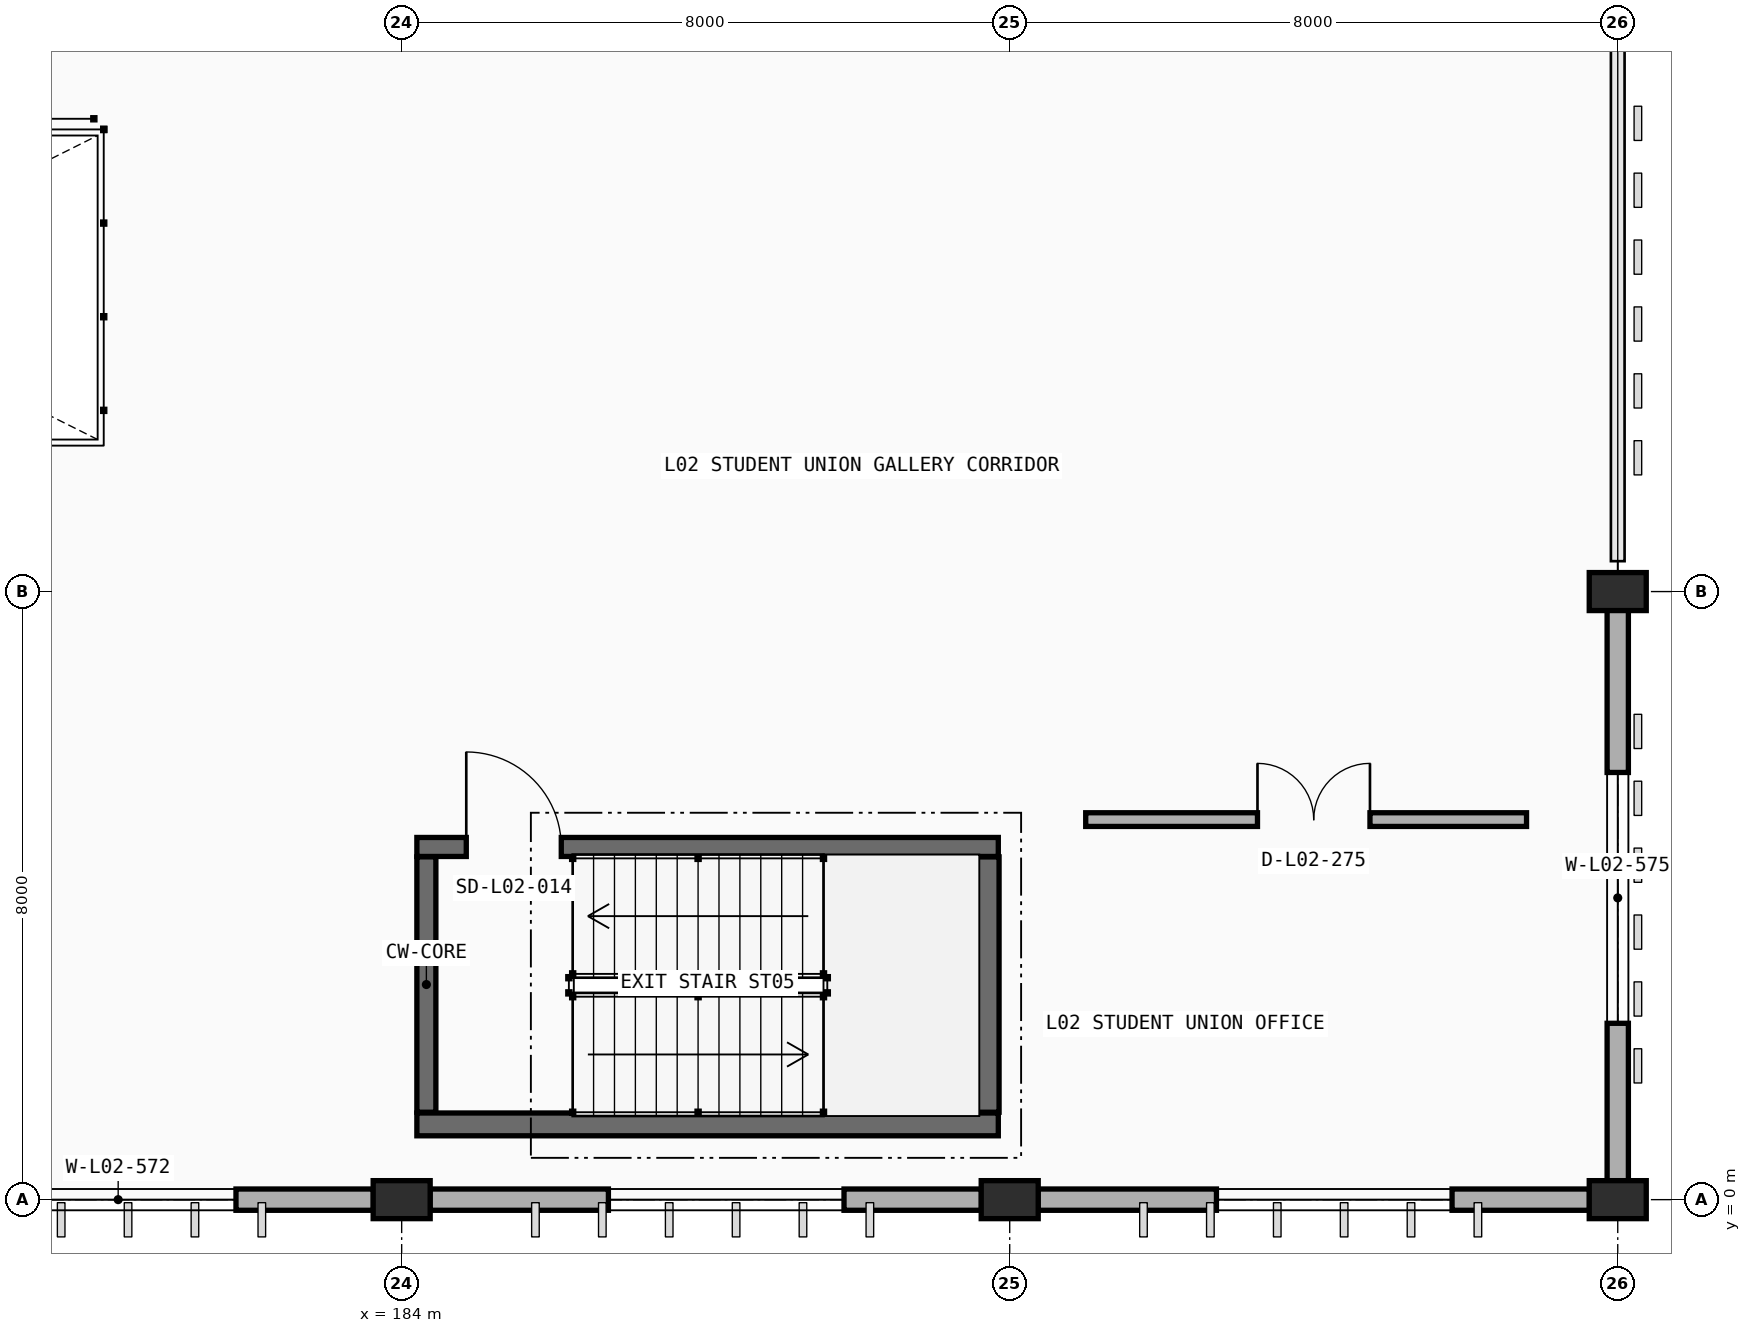
"""IFC4 building model, lengths in metres.
Left out: names, types, materials, properties, quantities, classifications, styles, units other than length and angle.
Written with IfcOpenShell. Run it as: python <this file> out.ifc"""

import sys

from ifc_helpers import new_model, si_unit, direction, frame, frame_2d, origin, origin_2d, place, context, subcontext, project, spatial, rectangle, extrude, element, fill, save


model = new_model("IFC4")
c1 = context("Model", 3, precision=1e-05, world=origin(), true_north=direction((0.0, 1.0)))
c2 = subcontext(c1, "Body", "Model", "MODEL_VIEW")
j1 = project(units=[si_unit("LENGTHUNIT", "METRE"), si_unit("PLANEANGLEUNIT", "RADIAN")], contexts=[c1])
p1 = place(None, origin())
s1 = spatial("IfcSite", under=j1, at=p1, CompositionType="ELEMENT")
p2 = place(p1, origin())
s2 = spatial("IfcBuilding", under=s1, at=p2, CompositionType="ELEMENT")
p3 = place(p2, frame((0.0, 0.0, 4.8)))
s3 = spatial("IfcBuildingStorey", under=s2, at=p3, CompositionType="ELEMENT", Elevation=4.8)
for number, where, z_axis, x_axis in (
    (1, (184.0, 0.0, 0.0), (0.0, 0.0, 1.0), (0.0, 1.0, 0.0)),
    (2, (192.0, 0.0, 0.0), (0.0, 0.0, 1.0), (0.0, 1.0, 0.0)),
    (3, (200.0, 0.0, 0.0), (0.0, 0.0, 1.0), (0.0, 1.0, 0.0)),
    (4, (200.0, 8.0, 0.0), (0.0, 0.0, 1.0), (0.0, 1.0, 0.0)),
):
    element("IfcColumn", number, at=place(p3, frame(where, z_axis=z_axis, x_axis=x_axis)), inside=s3, PredefinedType="COLUMN", context=c2, shape_type="SweptSolid", body=[
        extrude(rectangle(XDim=0.5, YDim=0.75, at=origin_2d()), origin(), (0.0, 0.0, 1.0), 4.8),
    ])
p4 = place(p3, frame((183.628, 0.0, 0.0), z_axis=(0.0, 0.0, 1.0), x_axis=(-1.0, 0.0, 0.0)))
e5 = element("IfcWall", 5, at=p4, inside=s3, PredefinedType="STANDARD", context=c2, shape_type="SweptSolid", body=[
    extrude(rectangle(XDim=7.256, YDim=0.28, at=frame_2d((3.628, 0.0))), origin(), (0.0, 0.0, 1.0), 3.89),
])
p5 = place(p4, frame((1.808, 0.0, 0.9)))
e6 = element("IfcOpeningElement", 6, at=p5, cuts=e5, PredefinedType="OPENING", context=c2, shape_type="SweptSolid", body=[
    extrude(rectangle(XDim=3.1, YDim=1.6, at=frame_2d((1.55, 0.8))), frame((0.0, 0.15, 0.0), z_axis=(0.0, -1.0, 0.0), x_axis=(1.0, 0.0, 0.0)), (0.0, 0.0, 1.0), 0.3),
])
p6 = place(p3, frame((191.628, 0.0, 0.0), z_axis=(0.0, 0.0, 1.0), x_axis=(-1.0, 0.0, 0.0)))
e7 = element("IfcWall", 7, at=p6, inside=s3, PredefinedType="STANDARD", context=c2, shape_type="SweptSolid", body=[
    extrude(rectangle(XDim=7.256, YDim=0.28, at=frame_2d((3.628, 0.0))), origin(), (0.0, 0.0, 1.0), 3.89),
])
p7 = place(p6, frame((1.808, 0.0, 0.9)))
e8 = element("IfcOpeningElement", 8, at=p7, cuts=e7, PredefinedType="OPENING", context=c2, shape_type="SweptSolid", body=[
    extrude(rectangle(XDim=3.1, YDim=1.6, at=frame_2d((1.55, 0.8))), frame((0.0, 0.15, 0.0), z_axis=(0.0, -1.0, 0.0), x_axis=(1.0, 0.0, 0.0)), (0.0, 0.0, 1.0), 0.3),
])
p8 = place(p3, frame((199.628, 0.0, 0.0), z_axis=(0.0, 0.0, 1.0), x_axis=(-1.0, 0.0, 0.0)))
e9 = element("IfcWall", 9, at=p8, inside=s3, PredefinedType="STANDARD", context=c2, shape_type="SweptSolid", body=[
    extrude(rectangle(XDim=7.256, YDim=0.28, at=frame_2d((3.628, 0.0))), origin(), (0.0, 0.0, 1.0), 3.89),
])
p9 = place(p8, frame((1.808, 0.0, 0.9)))
e10 = element("IfcOpeningElement", 10, at=p9, cuts=e9, PredefinedType="OPENING", context=c2, shape_type="SweptSolid", body=[
    extrude(rectangle(XDim=3.1, YDim=1.6, at=frame_2d((1.55, 0.8))), frame((0.0, 0.15, 0.0), z_axis=(0.0, -1.0, 0.0), x_axis=(1.0, 0.0, 0.0)), (0.0, 0.0, 1.0), 0.3),
])
p10 = place(p3, frame((200.0, 7.753, 0.0), z_axis=(0.0, 0.0, 1.0), x_axis=(0.0, -1.0, 0.0)))
e11 = element("IfcWall", 11, at=p10, inside=s3, PredefinedType="STANDARD", context=c2, shape_type="SweptSolid", body=[
    extrude(rectangle(XDim=7.506, YDim=0.28, at=frame_2d((3.753, 0.0))), origin(), (0.0, 0.0, 1.0), 3.59),
])
p11 = place(p10, frame((2.133, 0.0, 0.95)))
e12 = element("IfcOpeningElement", 12, at=p11, cuts=e11, PredefinedType="OPENING", context=c2, shape_type="SweptSolid", body=[
    extrude(rectangle(XDim=3.3, YDim=1.75, at=frame_2d((1.65, 0.875))), frame((0.0, 0.15, 0.0), z_axis=(0.0, -1.0, 0.0), x_axis=(1.0, 0.0, 0.0)), (0.0, 0.0, 1.0), 0.3),
])
p12 = place(p3, frame((184.2, 0.99, 0.0), z_axis=(0.0, 0.0, 1.0), x_axis=(1.0, 0.0, 0.0)))
e13 = element("IfcWall", 13, at=p12, inside=s3, PredefinedType="SHEAR", context=c2, shape_type="SweptSolid", body=[
    extrude(rectangle(XDim=7.65, YDim=0.3, at=frame_2d((3.825, 0.0))), origin(), (0.0, 0.0, 1.0), 4.8),
])
p13 = place(p3, frame((191.71, 1.15, 0.0), z_axis=(0.0, 0.0, 1.0), x_axis=(0.0, 1.0, 0.0)))
e14 = element("IfcWall", 14, at=p13, inside=s3, PredefinedType="SHEAR", context=c2, shape_type="SweptSolid", body=[
    extrude(rectangle(XDim=3.36, YDim=0.3, at=frame_2d((1.68, 0.0))), origin(), (0.0, 0.0, 1.0), 4.8),
])
p14 = place(p3, frame((184.2, 4.64, 0.0), z_axis=(0.0, 0.0, 1.0), x_axis=(1.0, 0.0, 0.0)))
e15 = element("IfcWall", 15, at=p14, inside=s3, PredefinedType="SOLIDWALL", context=c2, shape_type="SweptSolid", body=[
    extrude(rectangle(XDim=7.65, YDim=0.25, at=frame_2d((3.825, 0.0))), origin(), (0.0, 0.0, 1.0), 4.8),
])
p15 = place(p14, frame((0.65, 0.0, 0.0)))
e16 = element("IfcOpeningElement", 16, at=p15, cuts=e15, PredefinedType="OPENING", context=c2, shape_type="SweptSolid", body=[
    extrude(rectangle(XDim=1.25, YDim=2.15, at=frame_2d((0.625, 1.075))), frame((0.0, 0.135, 0.0), z_axis=(0.0, -1.0, 0.0), x_axis=(1.0, 0.0, 0.0)), (0.0, 0.0, 1.0), 0.27),
])
p16 = place(p3, frame((184.325, 1.15, 0.0), z_axis=(0.0, 0.0, 1.0), x_axis=(0.0, 1.0, 0.0)))
e17 = element("IfcWall", 17, at=p16, inside=s3, PredefinedType="SOLIDWALL", context=c2, shape_type="SweptSolid", body=[
    extrude(rectangle(XDim=3.36, YDim=0.25, at=frame_2d((1.68, 0.0))), origin(), (0.0, 0.0, 1.0), 4.8),
])
p17 = place(p3, frame((193.0, 5.0, 0.0), z_axis=(0.0, 0.0, 1.0), x_axis=(1.0, 0.0, 0.0)))
e18 = element("IfcWall", 18, at=p17, inside=s3, PredefinedType="PARTITIONING", context=c2, shape_type="SweptSolid", body=[
    extrude(rectangle(XDim=5.8, YDim=0.18, at=frame_2d((2.9, 0.0))), origin(), (0.0, 0.0, 1.0), 3.9),
])
p18 = place(p17, frame((2.26, 0.0, 0.0)))
e19 = element("IfcOpeningElement", 19, at=p18, cuts=e18, PredefinedType="OPENING", context=c2, shape_type="SweptSolid", body=[
    extrude(rectangle(XDim=1.48, YDim=2.2, at=frame_2d((0.74, 1.1))), frame((0.0, 0.1, 0.0), z_axis=(0.0, -1.0, 0.0), x_axis=(1.0, 0.0, 0.0)), (0.0, 0.0, 1.0), 0.2),
])
p19 = place(p5, origin())
e20 = element("IfcWindow", 20, at=p19, inside=s3, PartitioningType="DOUBLE_PANEL_VERTICAL", PredefinedType="WINDOW", context=c2, shape_type="SweptSolid", body=[
    extrude(rectangle(XDim=3.1, YDim=1.6, at=frame_2d((1.55, 0.8))), frame((0.0, 0.03, 0.0), z_axis=(0.0, -1.0, 0.0), x_axis=(1.0, 0.0, 0.0)), (0.0, 0.0, 1.0), 0.06),
])
fill(e6, e20)
p20 = place(p7, origin())
e21 = element("IfcWindow", 21, at=p20, inside=s3, PartitioningType="DOUBLE_PANEL_VERTICAL", PredefinedType="WINDOW", context=c2, shape_type="SweptSolid", body=[
    extrude(rectangle(XDim=3.1, YDim=1.6, at=frame_2d((1.55, 0.8))), frame((0.0, 0.03, 0.0), z_axis=(0.0, -1.0, 0.0), x_axis=(1.0, 0.0, 0.0)), (0.0, 0.0, 1.0), 0.06),
])
fill(e8, e21)
p21 = place(p9, origin())
e22 = element("IfcWindow", 22, at=p21, inside=s3, PartitioningType="DOUBLE_PANEL_VERTICAL", PredefinedType="WINDOW", context=c2, shape_type="SweptSolid", body=[
    extrude(rectangle(XDim=3.1, YDim=1.6, at=frame_2d((1.55, 0.8))), frame((0.0, 0.03, 0.0), z_axis=(0.0, -1.0, 0.0), x_axis=(1.0, 0.0, 0.0)), (0.0, 0.0, 1.0), 0.06),
])
fill(e10, e22)
p22 = place(p11, origin())
e23 = element("IfcWindow", 23, at=p22, inside=s3, PartitioningType="DOUBLE_PANEL_VERTICAL", PredefinedType="WINDOW", context=c2, shape_type="SweptSolid", body=[
    extrude(rectangle(XDim=3.3, YDim=1.75, at=frame_2d((1.65, 0.875))), frame((0.0, 0.03, 0.0), z_axis=(0.0, -1.0, 0.0), x_axis=(1.0, 0.0, 0.0)), (0.0, 0.0, 1.0), 0.06),
])
fill(e12, e23)
p23 = place(p15, origin())
e24 = element("IfcDoor", 24, at=p23, inside=s3, OperationType="SINGLE_SWING_LEFT", PredefinedType="DOOR", context=c2, shape_type="SweptSolid", body=[
    extrude(rectangle(XDim=1.25, YDim=2.15, at=frame_2d((0.625, 1.075))), frame((0.0, 0.025, 0.0), z_axis=(0.0, -1.0, 0.0), x_axis=(1.0, 0.0, 0.0)), (0.0, 0.0, 1.0), 0.05),
])
fill(e16, e24)
p24 = place(p18, origin())
e25 = element("IfcDoor", 25, at=p24, inside=s3, OperationType="DOUBLE_DOOR_SINGLE_SWING", PredefinedType="DOOR", context=c2, shape_type="SweptSolid", body=[
    extrude(rectangle(XDim=1.48, YDim=2.2, at=frame_2d((0.74, 1.1))), frame((0.0, 0.025, 0.0), z_axis=(0.0, -1.0, 0.0), x_axis=(1.0, 0.0, 0.0)), (0.0, 0.0, 1.0), 0.05),
])
fill(e19, e25)
save(model, sys.argv[1])
